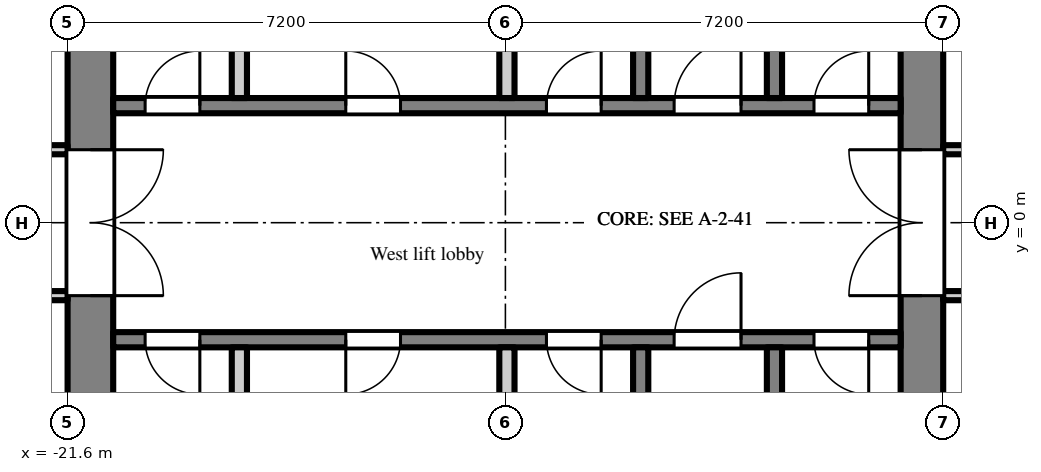
"""IFC4 building model, lengths in metres.
Left out: names, types, materials, properties, quantities, classifications, styles, units other than length and angle.
Written with IfcOpenShell. Run it as: python <this file> out.ifc"""

import sys

from ifc_helpers import new_model, si_unit, direction, frame, frame_2d, origin, place, context, subcontext, project, spatial, polyline, rectangle, outline, extrude, element, fill, save


model = new_model("IFC4")
c1 = context("Model", 3, precision=1e-05, world=origin(), true_north=direction((0.0, 1.0)))
c2 = subcontext(c1, "Body", "Model", "MODEL_VIEW")
j1 = project(units=[si_unit("LENGTHUNIT", "METRE"), si_unit("PLANEANGLEUNIT", "RADIAN")], contexts=[c1])
p1 = place(None, origin())
s1 = spatial("IfcSite", under=j1, at=p1, CompositionType="ELEMENT")
p2 = place(p1, origin())
s2 = spatial("IfcBuilding", under=s1, at=p2, CompositionType="ELEMENT")
p3 = place(p2, frame((0.0, 0.0, 247.5)))
s3 = spatial("IfcBuildingStorey", under=s2, at=p3, CompositionType="ELEMENT", Elevation=247.5)
p4 = place(p3, frame((-7.55, -7.2, 0.0), z_axis=(0.0, 0.0, 1.0), x_axis=(0.0, 1.0, 0.0)))
e1 = element("IfcWall", 1, at=p4, inside=s3, PredefinedType="SHEAR", context=c2, shape_type="SweptSolid", body=[
    extrude(outline(polyline([(0.0, 0.0), (14.4, 0.0), (14.4, 10.033), (7.2, 13.7), (0.0, 10.033), (0.0, 0.0)])), frame((0.0, 0.35, 0.0), z_axis=(0.0, -1.0, 0.0), x_axis=(1.0, 0.0, 0.0)), (0.0, 0.0, 1.0), 0.7),
])
p5 = place(p4, frame((6.0, 0.0, 0.0)))
e2 = element("IfcOpeningElement", 2, at=p5, cuts=e1, PredefinedType="OPENING", context=c2, shape_type="SweptSolid", body=[
    extrude(rectangle(XDim=2.4, YDim=2.2, at=frame_2d((1.2, 1.1))), frame((0.0, 0.36, 0.0), z_axis=(0.0, -1.0, 0.0), x_axis=(1.0, 0.0, 0.0)), (0.0, 0.0, 1.0), 0.72),
])
p6 = place(p3, frame((-21.225, -7.2, 0.0), z_axis=(0.0, 0.0, 1.0), x_axis=(0.0, 1.0, 0.0)))
e3 = element("IfcWall", 3, at=p6, inside=s3, PredefinedType="SHEAR", context=c2, shape_type="SweptSolid", body=[
    extrude(outline(polyline([(0.0, 0.0), (14.4, 0.0), (14.4, 10.033), (7.2, 13.7), (0.0, 10.033), (0.0, 0.0)])), frame((0.0, 0.375, 0.0), z_axis=(0.0, -1.0, 0.0), x_axis=(1.0, 0.0, 0.0)), (0.0, 0.0, 1.0), 0.75),
])
p7 = place(p6, frame((6.0, 0.0, 0.0)))
e4 = element("IfcOpeningElement", 4, at=p7, cuts=e3, PredefinedType="OPENING", context=c2, shape_type="SweptSolid", body=[
    extrude(rectangle(XDim=2.4, YDim=2.2, at=frame_2d((1.2, 1.1))), frame((0.0, 0.385, 0.0), z_axis=(0.0, -1.0, 0.0), x_axis=(1.0, 0.0, 0.0)), (0.0, 0.0, 1.0), 0.77),
])
p8 = place(p3, frame((-7.9, 1.925, 0.0), z_axis=(0.0, 0.0, 1.0), x_axis=(-1.0, 0.0, 0.0)))
e5 = element("IfcWall", 5, at=p8, inside=s3, PredefinedType="SHEAR", context=c2, shape_type="SweptSolid", body=[
    extrude(rectangle(XDim=12.95, YDim=0.25, at=frame_2d((6.475, 0.0))), origin(), (0.0, 0.0, 1.0), 12.72),
])
p9 = place(p8, frame((0.525, 0.0, 0.0)))
e6 = element("IfcOpeningElement", 6, at=p9, cuts=e5, PredefinedType="OPENING", context=c2, shape_type="SweptSolid", body=[
    extrude(rectangle(XDim=0.9, YDim=2.1, at=frame_2d((0.45, 1.05))), frame((0.0, 0.135, 0.0), z_axis=(0.0, -1.0, 0.0), x_axis=(1.0, 0.0, 0.0)), (0.0, 0.0, 1.0), 0.27),
])
p10 = place(p8, frame((2.625, 0.0, 0.0)))
e7 = element("IfcOpeningElement", 7, at=p10, cuts=e5, PredefinedType="OPENING", context=c2, shape_type="SweptSolid", body=[
    extrude(rectangle(XDim=1.1, YDim=2.1, at=frame_2d((0.55, 1.05))), frame((0.0, 0.135, 0.0), z_axis=(0.0, -1.0, 0.0), x_axis=(1.0, 0.0, 0.0)), (0.0, 0.0, 1.0), 0.27),
])
p11 = place(p8, frame((4.925, 0.0, 0.0)))
e8 = element("IfcOpeningElement", 8, at=p11, cuts=e5, PredefinedType="OPENING", context=c2, shape_type="SweptSolid", body=[
    extrude(rectangle(XDim=0.9, YDim=2.1, at=frame_2d((0.45, 1.05))), frame((0.0, 0.135, 0.0), z_axis=(0.0, -1.0, 0.0), x_axis=(1.0, 0.0, 0.0)), (0.0, 0.0, 1.0), 0.27),
])
p12 = place(p8, frame((8.225, 0.0, 0.0)))
e9 = element("IfcOpeningElement", 9, at=p12, cuts=e5, PredefinedType="OPENING", context=c2, shape_type="SweptSolid", body=[
    extrude(rectangle(XDim=0.9, YDim=2.1, at=frame_2d((0.45, 1.05))), frame((0.0, 0.135, 0.0), z_axis=(0.0, -1.0, 0.0), x_axis=(1.0, 0.0, 0.0)), (0.0, 0.0, 1.0), 0.27),
])
p13 = place(p8, frame((11.525, 0.0, 0.0)))
e10 = element("IfcOpeningElement", 10, at=p13, cuts=e5, PredefinedType="OPENING", context=c2, shape_type="SweptSolid", body=[
    extrude(rectangle(XDim=0.9, YDim=2.1, at=frame_2d((0.45, 1.05))), frame((0.0, 0.135, 0.0), z_axis=(0.0, -1.0, 0.0), x_axis=(1.0, 0.0, 0.0)), (0.0, 0.0, 1.0), 0.27),
])
p14 = place(p3, frame((-9.975, 2.05, 0.0), z_axis=(0.0, 0.0, 1.0), x_axis=(0.0, 1.0, 0.0)))
e11 = element("IfcWall", 11, at=p14, inside=s3, PredefinedType="SHEAR", context=c2, shape_type="SweptSolid", body=[
    extrude(outline(polyline([(0.0, 0.0), (4.75, 0.0), (4.75, 10.237), (0.0, 12.656), (0.0, 0.0)])), frame((0.0, 0.125, 0.0), z_axis=(0.0, -1.0, 0.0), x_axis=(1.0, 0.0, 0.0)), (0.0, 0.0, 1.0), 0.25),
])
p15 = place(p14, frame((2.95, 0.0, 0.0)))
e12 = element("IfcOpeningElement", 12, at=p15, cuts=e11, PredefinedType="OPENING", context=c2, shape_type="SweptSolid", body=[
    extrude(rectangle(XDim=1.1, YDim=2.1, at=frame_2d((0.55, 1.05))), frame((0.0, 0.135, 0.0), z_axis=(0.0, -1.0, 0.0), x_axis=(1.0, 0.0, 0.0)), (0.0, 0.0, 1.0), 0.27),
])
p16 = place(p3, frame((-12.175, 2.05, 0.0), z_axis=(0.0, 0.0, 1.0), x_axis=(0.0, 1.0, 0.0)))
e13 = element("IfcWall", 13, at=p16, inside=s3, PredefinedType="SHEAR", context=c2, shape_type="SweptSolid", body=[
    extrude(outline(polyline([(0.0, 0.0), (4.75, 0.0), (4.75, 10.237), (0.0, 12.656), (0.0, 0.0)])), frame((0.0, 0.125, 0.0), z_axis=(0.0, -1.0, 0.0), x_axis=(1.0, 0.0, 0.0)), (0.0, 0.0, 1.0), 0.25),
])
p17 = place(p16, frame((3.0, 0.0, 0.0)))
e14 = element("IfcOpeningElement", 14, at=p17, cuts=e13, PredefinedType="OPENING", context=c2, shape_type="SweptSolid", body=[
    extrude(rectangle(XDim=1.1, YDim=2.1, at=frame_2d((0.55, 1.05))), frame((0.0, 0.135, 0.0), z_axis=(0.0, -1.0, 0.0), x_axis=(1.0, 0.0, 0.0)), (0.0, 0.0, 1.0), 0.27),
])
for number, where, z_axis, x_axis in (
    (15, (-14.375, 2.05, 0.0), (0.0, 0.0, 1.0), (0.0, 1.0, 0.0)),
    (16, (-18.775, 2.05, 0.0), (0.0, 0.0, 1.0), (0.0, 1.0, 0.0)),
):
    element("IfcWall", number, at=place(p3, frame(where, z_axis=z_axis, x_axis=x_axis)), inside=s3, PredefinedType="PARTITIONING", context=c2, shape_type="SweptSolid", body=[
        extrude(outline(polyline([(0.0, 0.0), (2.1, 0.0), (2.1, 11.587), (0.0, 12.656), (0.0, 0.0)])), frame((0.0, 0.125, 0.0), z_axis=(0.0, -1.0, 0.0), x_axis=(1.0, 0.0, 0.0)), (0.0, 0.0, 1.0), 0.25),
    ])
p18 = place(p3, frame((-7.9, -1.925, 0.0), z_axis=(0.0, 0.0, 1.0), x_axis=(-1.0, 0.0, 0.0)))
e17 = element("IfcWall", 17, at=p18, inside=s3, PredefinedType="SHEAR", context=c2, shape_type="SweptSolid", body=[
    extrude(rectangle(XDim=12.95, YDim=0.25, at=frame_2d((6.475, 0.0))), origin(), (0.0, 0.0, 1.0), 12.72),
])
p19 = place(p18, frame((0.525, 0.0, 0.0)))
e18 = element("IfcOpeningElement", 18, at=p19, cuts=e17, PredefinedType="OPENING", context=c2, shape_type="SweptSolid", body=[
    extrude(rectangle(XDim=0.9, YDim=2.1, at=frame_2d((0.45, 1.05))), frame((0.0, 0.135, 0.0), z_axis=(0.0, -1.0, 0.0), x_axis=(1.0, 0.0, 0.0)), (0.0, 0.0, 1.0), 0.27),
])
p20 = place(p18, frame((2.625, 0.0, 0.0)))
e19 = element("IfcOpeningElement", 19, at=p20, cuts=e17, PredefinedType="OPENING", context=c2, shape_type="SweptSolid", body=[
    extrude(rectangle(XDim=1.1, YDim=2.1, at=frame_2d((0.55, 1.05))), frame((0.0, 0.135, 0.0), z_axis=(0.0, -1.0, 0.0), x_axis=(1.0, 0.0, 0.0)), (0.0, 0.0, 1.0), 0.27),
])
p21 = place(p18, frame((4.925, 0.0, 0.0)))
e20 = element("IfcOpeningElement", 20, at=p21, cuts=e17, PredefinedType="OPENING", context=c2, shape_type="SweptSolid", body=[
    extrude(rectangle(XDim=0.9, YDim=2.1, at=frame_2d((0.45, 1.05))), frame((0.0, 0.135, 0.0), z_axis=(0.0, -1.0, 0.0), x_axis=(1.0, 0.0, 0.0)), (0.0, 0.0, 1.0), 0.27),
])
p22 = place(p18, frame((8.225, 0.0, 0.0)))
e21 = element("IfcOpeningElement", 21, at=p22, cuts=e17, PredefinedType="OPENING", context=c2, shape_type="SweptSolid", body=[
    extrude(rectangle(XDim=0.9, YDim=2.1, at=frame_2d((0.45, 1.05))), frame((0.0, 0.135, 0.0), z_axis=(0.0, -1.0, 0.0), x_axis=(1.0, 0.0, 0.0)), (0.0, 0.0, 1.0), 0.27),
])
p23 = place(p18, frame((11.525, 0.0, 0.0)))
e22 = element("IfcOpeningElement", 22, at=p23, cuts=e17, PredefinedType="OPENING", context=c2, shape_type="SweptSolid", body=[
    extrude(rectangle(XDim=0.9, YDim=2.1, at=frame_2d((0.45, 1.05))), frame((0.0, 0.135, 0.0), z_axis=(0.0, -1.0, 0.0), x_axis=(1.0, 0.0, 0.0)), (0.0, 0.0, 1.0), 0.27),
])
p24 = place(p3, frame((-9.975, -2.05, 0.0), z_axis=(0.0, 0.0, 1.0), x_axis=(0.0, -1.0, 0.0)))
e23 = element("IfcWall", 23, at=p24, inside=s3, PredefinedType="SHEAR", context=c2, shape_type="SweptSolid", body=[
    extrude(outline(polyline([(0.0, 0.0), (4.75, 0.0), (4.75, 10.237), (0.0, 12.656), (0.0, 0.0)])), frame((0.0, 0.125, 0.0), z_axis=(0.0, -1.0, 0.0), x_axis=(1.0, 0.0, 0.0)), (0.0, 0.0, 1.0), 0.25),
])
p25 = place(p3, frame((-12.175, -2.05, 0.0), z_axis=(0.0, 0.0, 1.0), x_axis=(0.0, -1.0, 0.0)))
e24 = element("IfcWall", 24, at=p25, inside=s3, PredefinedType="SHEAR", context=c2, shape_type="SweptSolid", body=[
    extrude(outline(polyline([(0.0, 0.0), (4.75, 0.0), (4.75, 10.237), (0.0, 12.656), (0.0, 0.0)])), frame((0.0, 0.125, 0.0), z_axis=(0.0, -1.0, 0.0), x_axis=(1.0, 0.0, 0.0)), (0.0, 0.0, 1.0), 0.25),
])
p26 = place(p25, frame((3.0, 0.0, 0.0)))
e25 = element("IfcOpeningElement", 25, at=p26, cuts=e24, PredefinedType="OPENING", context=c2, shape_type="SweptSolid", body=[
    extrude(rectangle(XDim=1.1, YDim=2.1, at=frame_2d((0.55, 1.05))), frame((0.0, 0.135, 0.0), z_axis=(0.0, -1.0, 0.0), x_axis=(1.0, 0.0, 0.0)), (0.0, 0.0, 1.0), 0.27),
])
for number, where, z_axis, x_axis in (
    (26, (-14.375, -2.05, 0.0), (0.0, 0.0, 1.0), (0.0, -1.0, 0.0)),
    (27, (-18.775, -2.05, 0.0), (0.0, 0.0, 1.0), (0.0, -1.0, 0.0)),
):
    element("IfcWall", number, at=place(p3, frame(where, z_axis=z_axis, x_axis=x_axis)), inside=s3, PredefinedType="PARTITIONING", context=c2, shape_type="SweptSolid", body=[
        extrude(outline(polyline([(0.0, 0.0), (2.1, 0.0), (2.1, 11.587), (0.0, 12.656), (0.0, 0.0)])), frame((0.0, 0.125, 0.0), z_axis=(0.0, -1.0, 0.0), x_axis=(1.0, 0.0, 0.0)), (0.0, 0.0, 1.0), 0.25),
    ])
p27 = place(p3, frame((-25.125, -1.2, 0.0), z_axis=(0.0, 0.0, 1.0), x_axis=(1.0, 0.0, 0.0)))
e28 = element("IfcWall", 28, at=p27, inside=s3, PredefinedType="PARTITIONING", context=c2, shape_type="SweptSolid", body=[
    extrude(rectangle(XDim=3.525, YDim=0.15, at=frame_2d((1.762, 0.0))), origin(), (0.0, 0.0, 1.0), 2.7),
])
p28 = place(p27, frame((1.125, 0.0, 0.0)))
e29 = element("IfcOpeningElement", 29, at=p28, cuts=e28, PredefinedType="OPENING", context=c2, shape_type="SweptSolid", body=[
    extrude(rectangle(XDim=1.2, YDim=2.1, at=frame_2d((0.6, 1.05))), frame((0.0, 0.085, 0.0), z_axis=(0.0, -1.0, 0.0), x_axis=(1.0, 0.0, 0.0)), (0.0, 0.0, 1.0), 0.17),
])
p29 = place(p3, frame((-25.125, 1.2, 0.0), z_axis=(0.0, 0.0, 1.0), x_axis=(1.0, 0.0, 0.0)))
e30 = element("IfcWall", 30, at=p29, inside=s3, PredefinedType="PARTITIONING", context=c2, shape_type="SweptSolid", body=[
    extrude(rectangle(XDim=3.525, YDim=0.15, at=frame_2d((1.762, 0.0))), origin(), (0.0, 0.0, 1.0), 2.7),
])
p30 = place(p29, frame((1.125, 0.0, 0.0)))
e31 = element("IfcOpeningElement", 31, at=p30, cuts=e30, PredefinedType="OPENING", context=c2, shape_type="SweptSolid", body=[
    extrude(rectangle(XDim=1.2, YDim=2.1, at=frame_2d((0.6, 1.05))), frame((0.0, 0.085, 0.0), z_axis=(0.0, -1.0, 0.0), x_axis=(1.0, 0.0, 0.0)), (0.0, 0.0, 1.0), 0.17),
])
p31 = place(p3, frame((-7.2, -1.2, 0.0), z_axis=(0.0, 0.0, 1.0), x_axis=(1.0, 0.0, 0.0)))
e32 = element("IfcWall", 32, at=p31, inside=s3, PredefinedType="PARTITIONING", context=c2, shape_type="SweptSolid", body=[
    extrude(rectangle(XDim=5.925, YDim=0.15, at=frame_2d((2.962, 0.0))), origin(), (0.0, 0.0, 1.0), 2.7),
])
p32 = place(p31, frame((4.625, 0.0, 0.0)))
e33 = element("IfcOpeningElement", 33, at=p32, cuts=e32, PredefinedType="OPENING", context=c2, shape_type="SweptSolid", body=[
    extrude(rectangle(XDim=1.2, YDim=2.1, at=frame_2d((0.6, 1.05))), frame((0.0, 0.085, 0.0), z_axis=(0.0, -1.0, 0.0), x_axis=(1.0, 0.0, 0.0)), (0.0, 0.0, 1.0), 0.17),
])
p33 = place(p3, frame((-7.2, 1.2, 0.0), z_axis=(0.0, 0.0, 1.0), x_axis=(1.0, 0.0, 0.0)))
e34 = element("IfcWall", 34, at=p33, inside=s3, PredefinedType="PARTITIONING", context=c2, shape_type="SweptSolid", body=[
    extrude(rectangle(XDim=5.925, YDim=0.15, at=frame_2d((2.962, 0.0))), origin(), (0.0, 0.0, 1.0), 2.7),
])
p34 = place(p9, frame((0.9, 0.0, 0.0), z_axis=(0.0, 0.0, 1.0), x_axis=(-1.0, 0.0, 0.0)))
e35 = element("IfcDoor", 35, at=p34, inside=s3, OperationType="SINGLE_SWING_RIGHT", PredefinedType="DOOR", context=c2, shape_type="SweptSolid", body=[
    extrude(rectangle(XDim=0.9, YDim=2.1, at=frame_2d((0.45, 1.05))), frame((0.0, 0.025, 0.0), z_axis=(0.0, -1.0, 0.0), x_axis=(1.0, 0.0, 0.0)), (0.0, 0.0, 1.0), 0.05),
])
fill(e6, e35)
p35 = place(p19, origin())
e36 = element("IfcDoor", 36, at=p35, inside=s3, OperationType="SINGLE_SWING_LEFT", PredefinedType="DOOR", context=c2, shape_type="SweptSolid", body=[
    extrude(rectangle(XDim=0.9, YDim=2.1, at=frame_2d((0.45, 1.05))), frame((0.0, 0.025, 0.0), z_axis=(0.0, -1.0, 0.0), x_axis=(1.0, 0.0, 0.0)), (0.0, 0.0, 1.0), 0.05),
])
fill(e18, e36)
p36 = place(p10, frame((1.1, 0.0, 0.0), z_axis=(0.0, 0.0, 1.0), x_axis=(-1.0, 0.0, 0.0)))
e37 = element("IfcDoor", 37, at=p36, inside=s3, OperationType="SINGLE_SWING_RIGHT", PredefinedType="DOOR", context=c2, shape_type="SweptSolid", body=[
    extrude(rectangle(XDim=1.1, YDim=2.1, at=frame_2d((0.55, 1.05))), frame((0.0, 0.025, 0.0), z_axis=(0.0, -1.0, 0.0), x_axis=(1.0, 0.0, 0.0)), (0.0, 0.0, 1.0), 0.05),
])
fill(e7, e37)
p37 = place(p20, frame((1.1, 0.0, 0.0), z_axis=(0.0, 0.0, 1.0), x_axis=(-1.0, 0.0, 0.0)))
e38 = element("IfcDoor", 38, at=p37, inside=s3, OperationType="SINGLE_SWING_RIGHT", PredefinedType="DOOR", context=c2, shape_type="SweptSolid", body=[
    extrude(rectangle(XDim=1.1, YDim=2.1, at=frame_2d((0.55, 1.05))), frame((0.0, 0.025, 0.0), z_axis=(0.0, -1.0, 0.0), x_axis=(1.0, 0.0, 0.0)), (0.0, 0.0, 1.0), 0.05),
])
fill(e19, e38)
p38 = place(p5, origin())
e39 = element("IfcDoor", 39, at=p38, inside=s3, OperationType="DOUBLE_DOOR_DOUBLE_SWING", PredefinedType="DOOR", context=c2, shape_type="SweptSolid", body=[
    extrude(rectangle(XDim=2.4, YDim=2.2, at=frame_2d((1.2, 1.1))), frame((0.0, 0.025, 0.0), z_axis=(0.0, -1.0, 0.0), x_axis=(1.0, 0.0, 0.0)), (0.0, 0.0, 1.0), 0.05),
])
fill(e2, e39)
p39 = place(p7, frame((2.4, 0.0, 0.0), z_axis=(0.0, 0.0, 1.0), x_axis=(-1.0, 0.0, 0.0)))
e40 = element("IfcDoor", 40, at=p39, inside=s3, OperationType="DOUBLE_DOOR_DOUBLE_SWING", PredefinedType="DOOR", context=c2, shape_type="SweptSolid", body=[
    extrude(rectangle(XDim=2.4, YDim=2.2, at=frame_2d((1.2, 1.1))), frame((0.0, 0.025, 0.0), z_axis=(0.0, -1.0, 0.0), x_axis=(1.0, 0.0, 0.0)), (0.0, 0.0, 1.0), 0.05),
])
fill(e4, e40)
p40 = place(p11, frame((0.9, 0.0, 0.0), z_axis=(0.0, 0.0, 1.0), x_axis=(-1.0, 0.0, 0.0)))
e41 = element("IfcDoor", 41, at=p40, inside=s3, OperationType="SINGLE_SWING_RIGHT", PredefinedType="DOOR", context=c2, shape_type="SweptSolid", body=[
    extrude(rectangle(XDim=0.9, YDim=2.1, at=frame_2d((0.45, 1.05))), frame((0.0, 0.025, 0.0), z_axis=(0.0, -1.0, 0.0), x_axis=(1.0, 0.0, 0.0)), (0.0, 0.0, 1.0), 0.05),
])
fill(e8, e41)
p41 = place(p12, frame((0.9, 0.0, 0.0), z_axis=(0.0, 0.0, 1.0), x_axis=(-1.0, 0.0, 0.0)))
e42 = element("IfcDoor", 42, at=p41, inside=s3, OperationType="SINGLE_SWING_LEFT", PredefinedType="DOOR", context=c2, shape_type="SweptSolid", body=[
    extrude(rectangle(XDim=0.9, YDim=2.1, at=frame_2d((0.45, 1.05))), frame((0.0, 0.025, 0.0), z_axis=(0.0, -1.0, 0.0), x_axis=(1.0, 0.0, 0.0)), (0.0, 0.0, 1.0), 0.05),
])
fill(e9, e42)
p42 = place(p13, frame((0.9, 0.0, 0.0), z_axis=(0.0, 0.0, 1.0), x_axis=(-1.0, 0.0, 0.0)))
e43 = element("IfcDoor", 43, at=p42, inside=s3, OperationType="SINGLE_SWING_RIGHT", PredefinedType="DOOR", context=c2, shape_type="SweptSolid", body=[
    extrude(rectangle(XDim=0.9, YDim=2.1, at=frame_2d((0.45, 1.05))), frame((0.0, 0.025, 0.0), z_axis=(0.0, -1.0, 0.0), x_axis=(1.0, 0.0, 0.0)), (0.0, 0.0, 1.0), 0.05),
])
fill(e10, e43)
p43 = place(p21, origin())
e44 = element("IfcDoor", 44, at=p43, inside=s3, OperationType="SINGLE_SWING_LEFT", PredefinedType="DOOR", context=c2, shape_type="SweptSolid", body=[
    extrude(rectangle(XDim=0.9, YDim=2.1, at=frame_2d((0.45, 1.05))), frame((0.0, 0.025, 0.0), z_axis=(0.0, -1.0, 0.0), x_axis=(1.0, 0.0, 0.0)), (0.0, 0.0, 1.0), 0.05),
])
fill(e20, e44)
p44 = place(p22, origin())
e45 = element("IfcDoor", 45, at=p44, inside=s3, OperationType="SINGLE_SWING_RIGHT", PredefinedType="DOOR", context=c2, shape_type="SweptSolid", body=[
    extrude(rectangle(XDim=0.9, YDim=2.1, at=frame_2d((0.45, 1.05))), frame((0.0, 0.025, 0.0), z_axis=(0.0, -1.0, 0.0), x_axis=(1.0, 0.0, 0.0)), (0.0, 0.0, 1.0), 0.05),
])
fill(e21, e45)
p45 = place(p23, origin())
e46 = element("IfcDoor", 46, at=p45, inside=s3, OperationType="SINGLE_SWING_LEFT", PredefinedType="DOOR", context=c2, shape_type="SweptSolid", body=[
    extrude(rectangle(XDim=0.9, YDim=2.1, at=frame_2d((0.45, 1.05))), frame((0.0, 0.025, 0.0), z_axis=(0.0, -1.0, 0.0), x_axis=(1.0, 0.0, 0.0)), (0.0, 0.0, 1.0), 0.05),
])
fill(e22, e46)
save(model, sys.argv[1])
